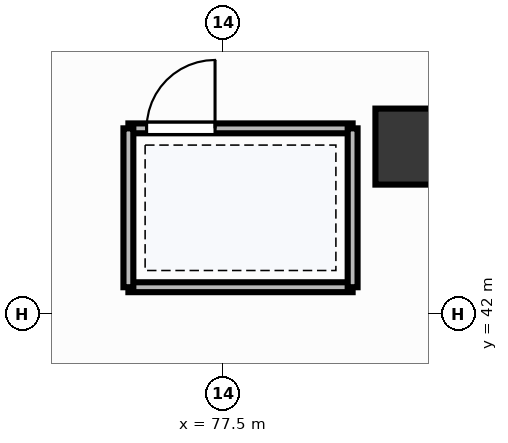
"""IFC4 building model, lengths in metres.
Left out: names, types, materials, properties, quantities, classifications, styles, units other than length and angle.
Written with IfcOpenShell. Run it as: python <this file> out.ifc"""

import sys

from ifc_helpers import new_model, si_unit, direction, frame, frame_2d, origin, origin_2d, place, context, subcontext, project, spatial, rectangle, extrude, element, fill, save


model = new_model("IFC4")
c1 = context("Model", 3, precision=1e-05, world=origin(), true_north=direction((0.0, 1.0)))
c2 = subcontext(c1, "Body", "Model", "MODEL_VIEW")
j1 = project(units=[si_unit("LENGTHUNIT", "METRE"), si_unit("PLANEANGLEUNIT", "RADIAN")], contexts=[c1])
p1 = place(None, origin())
s1 = spatial("IfcSite", under=j1, at=p1, CompositionType="ELEMENT")
p2 = place(p1, origin())
s2 = spatial("IfcBuilding", under=s1, at=p2, CompositionType="ELEMENT")
p3 = place(p2, frame((0.0, 0.0, 10.2)))
s3 = spatial("IfcBuildingStorey", under=s2, at=p3, CompositionType="ELEMENT", Elevation=10.2)
p4 = place(p3, frame((80.0, 44.2, 0.0), z_axis=(0.0, 0.0, 1.0), x_axis=(1.0, 0.0, 0.0)))
e1 = element("IfcColumn", 1, at=p4, inside=s3, PredefinedType="COLUMN", context=c2, shape_type="SweptSolid", body=[
    extrude(rectangle(XDim=1.0, YDim=1.0, at=origin_2d()), origin(), (0.0, 0.0, 1.0), 4.5),
])
p5 = place(p3, frame((76.25, 44.44, 0.0), z_axis=(0.0, 0.0, 1.0), x_axis=(1.0, 0.0, 0.0)))
e2 = element("IfcWall", 2, at=p5, inside=s3, PredefinedType="PARTITIONING", context=c2, shape_type="SweptSolid", body=[
    extrude(rectangle(XDim=2.95, YDim=0.13, at=frame_2d((1.475, 0.0))), origin(), (0.0, 0.0, 1.0), 3.46),
])
p6 = place(p5, frame((0.24, 0.0, 0.0)))
e3 = element("IfcOpeningElement", 3, at=p6, cuts=e2, PredefinedType="OPENING", context=c2, shape_type="SweptSolid", body=[
    extrude(rectangle(XDim=0.9, YDim=2.15, at=frame_2d((0.45, 1.075))), frame((0.0, 0.08, 0.0), z_axis=(0.0, -1.0, 0.0), x_axis=(1.0, 0.0, 0.0)), (0.0, 0.0, 1.0), 0.16),
])
p7 = place(p3, frame((79.2, 42.35, 0.0), z_axis=(0.0, 0.0, 1.0), x_axis=(-1.0, 0.0, 0.0)))
e4 = element("IfcWall", 4, at=p7, inside=s3, PredefinedType="PARTITIONING", context=c2, shape_type="SweptSolid", body=[
    extrude(rectangle(XDim=2.95, YDim=0.13, at=frame_2d((1.475, 0.0))), origin(), (0.0, 0.0, 1.0), 3.46),
])
for number, where, z_axis, x_axis in (
    (5, (76.25, 42.35, 0.0), (0.0, 0.0, 1.0), (0.0, 1.0, 0.0)),
    (6, (79.2, 44.44, 0.0), (0.0, 0.0, 1.0), (0.0, -1.0, 0.0)),
):
    element("IfcWall", number, at=place(p3, frame(where, z_axis=z_axis, x_axis=x_axis)), inside=s3, PredefinedType="PARTITIONING", context=c2, shape_type="SweptSolid", body=[
        extrude(rectangle(XDim=2.09, YDim=0.13, at=frame_2d((1.045, 0.0))), origin(), (0.0, 0.0, 1.0), 3.46),
    ])
p8 = place(p6, origin())
e7 = element("IfcDoor", 7, at=p8, inside=s3, OperationType="SINGLE_SWING_RIGHT", PredefinedType="DOOR", context=c2, shape_type="SweptSolid", body=[
    extrude(rectangle(XDim=0.9, YDim=2.15, at=frame_2d((0.45, 1.075))), frame((0.0, 0.025, 0.0), z_axis=(0.0, -1.0, 0.0), x_axis=(1.0, 0.0, 0.0)), (0.0, 0.0, 1.0), 0.05),
])
fill(e3, e7)
save(model, sys.argv[1])
